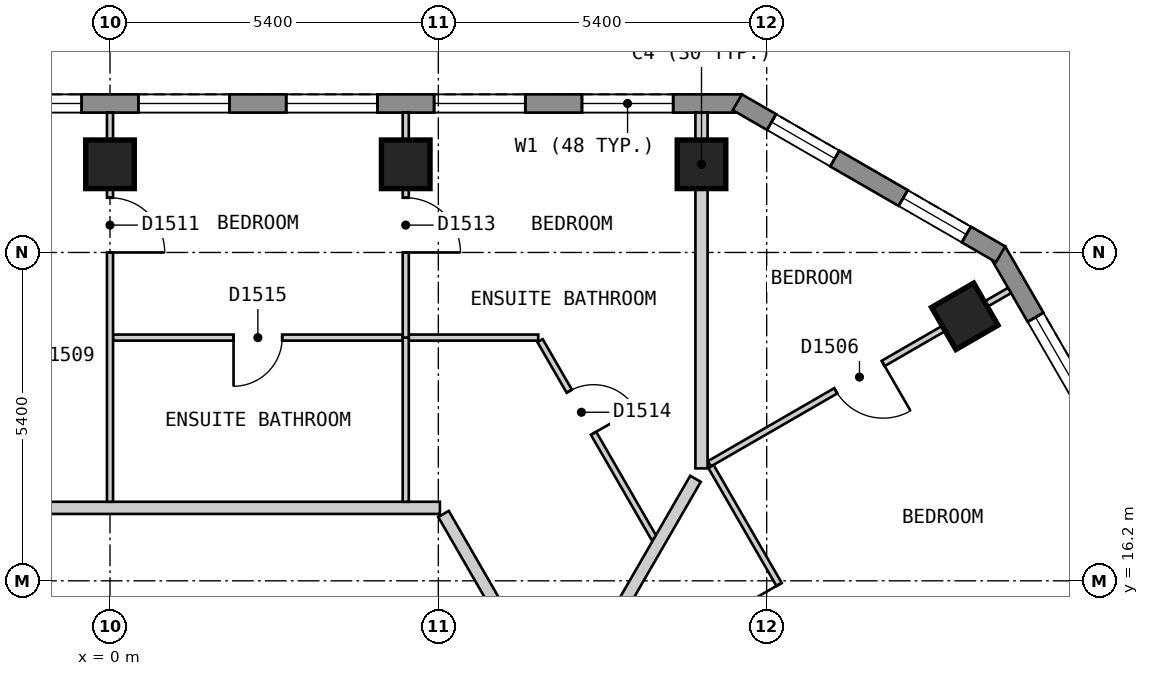
"""IFC4 building model, lengths in metres.
Left out: names, types, materials, properties, quantities, classifications, styles, units other than length and angle.
Written with IfcOpenShell. Run it as: python <this file> out.ifc"""

import sys

from ifc_helpers import new_model, si_unit, direction, frame, frame_2d, origin, origin_2d, place, context, subcontext, project, spatial, polyline, rectangle, outline, extrude, element, fill, save


model = new_model("IFC4")
c1 = context("Model", 3, precision=1e-05, world=origin(), true_north=direction((0.0, 1.0)))
c2 = subcontext(c1, "Body", "Model", "MODEL_VIEW")
j1 = project(units=[si_unit("LENGTHUNIT", "METRE"), si_unit("PLANEANGLEUNIT", "RADIAN")], contexts=[c1])
p1 = place(None, origin())
s1 = spatial("IfcSite", under=j1, at=p1, CompositionType="ELEMENT")
p2 = place(p1, origin())
s2 = spatial("IfcBuilding", under=s1, at=p2, CompositionType="ELEMENT")
p3 = place(p2, frame((0.0, 0.0, 184.2)))
s3 = spatial("IfcBuildingStorey", under=s2, at=p3, CompositionType="ELEMENT", Elevation=184.2)
for number, where, z_axis, x_axis in (
    (1, (9.728, 23.05, 0.0), (0.0, 0.0, 1.0), (-1.0, 0.0, 0.0)),
    (2, (4.864, 23.05, 0.0), (0.0, 0.0, 1.0), (-1.0, 0.0, 0.0)),
    (3, (0.0, 23.05, 0.0), (0.0, 0.0, 1.0), (-1.0, 0.0, 0.0)),
    (4, (14.058, 20.55, 0.0), (0.0, 0.0, 1.0), (-0.5, 0.866, 0.0)),
):
    element("IfcColumn", number, at=place(p3, frame(where, z_axis=z_axis, x_axis=x_axis)), inside=s3, PredefinedType="COLUMN", context=c2, shape_type="SweptSolid", body=[
        extrude(rectangle(XDim=0.8, YDim=0.8, at=origin_2d()), origin(), (0.0, 0.0, 1.0), 3.0),
    ])
p4 = place(p3, frame((10.392, 24.05, 0.0), z_axis=(0.0, 0.0, 1.0), x_axis=(-1.0, 0.0, 0.0)))
e5 = element("IfcWall", 5, at=p4, inside=s3, PredefinedType="SOLIDWALL", context=c2, shape_type="SweptSolid", body=[
    extrude(outline(polyline([(0.0, -0.15), (20.784, -0.15), (20.704, 0.15), (0.08, 0.15), (0.0, -0.15)])), origin(), (0.0, 0.0, 1.0), 2.7),
])
p5 = place(p4, frame((1.13, 0.0, 0.15)))
e6 = element("IfcOpeningElement", 6, at=p5, cuts=e5, PredefinedType="OPENING", context=c2, shape_type="SweptSolid", body=[
    extrude(rectangle(XDim=1.5, YDim=2.1, at=frame_2d((0.75, 1.05))), frame((0.0, 0.16, 0.0), z_axis=(0.0, -1.0, 0.0), x_axis=(1.0, 0.0, 0.0)), (0.0, 0.0, 1.0), 0.32),
])
p6 = place(p4, frame((3.562, 0.0, 0.15)))
e7 = element("IfcOpeningElement", 7, at=p6, cuts=e5, PredefinedType="OPENING", context=c2, shape_type="SweptSolid", body=[
    extrude(rectangle(XDim=1.5, YDim=2.1, at=frame_2d((0.75, 1.05))), frame((0.0, 0.16, 0.0), z_axis=(0.0, -1.0, 0.0), x_axis=(1.0, 0.0, 0.0)), (0.0, 0.0, 1.0), 0.32),
])
p7 = place(p4, frame((5.994, 0.0, 0.15)))
e8 = element("IfcOpeningElement", 8, at=p7, cuts=e5, PredefinedType="OPENING", context=c2, shape_type="SweptSolid", body=[
    extrude(rectangle(XDim=1.5, YDim=2.1, at=frame_2d((0.75, 1.05))), frame((0.0, 0.16, 0.0), z_axis=(0.0, -1.0, 0.0), x_axis=(1.0, 0.0, 0.0)), (0.0, 0.0, 1.0), 0.32),
])
p8 = place(p4, frame((8.426, 0.0, 0.15)))
e9 = element("IfcOpeningElement", 9, at=p8, cuts=e5, PredefinedType="OPENING", context=c2, shape_type="SweptSolid", body=[
    extrude(rectangle(XDim=1.5, YDim=2.1, at=frame_2d((0.75, 1.05))), frame((0.0, 0.16, 0.0), z_axis=(0.0, -1.0, 0.0), x_axis=(1.0, 0.0, 0.0)), (0.0, 0.0, 1.0), 0.32),
])
p9 = place(p4, frame((10.858, 0.0, 0.15)))
e10 = element("IfcOpeningElement", 10, at=p9, cuts=e5, PredefinedType="OPENING", context=c2, shape_type="SweptSolid", body=[
    extrude(rectangle(XDim=1.5, YDim=2.1, at=frame_2d((0.75, 1.05))), frame((0.0, 0.16, 0.0), z_axis=(0.0, -1.0, 0.0), x_axis=(1.0, 0.0, 0.0)), (0.0, 0.0, 1.0), 0.32),
])
p10 = place(p4, frame((13.29, 0.0, 0.15)))
e11 = element("IfcOpeningElement", 11, at=p10, cuts=e5, PredefinedType="OPENING", context=c2, shape_type="SweptSolid", body=[
    extrude(rectangle(XDim=1.5, YDim=2.1, at=frame_2d((0.75, 1.05))), frame((0.0, 0.16, 0.0), z_axis=(0.0, -1.0, 0.0), x_axis=(1.0, 0.0, 0.0)), (0.0, 0.0, 1.0), 0.32),
])
p11 = place(p4, frame((15.722, 0.0, 0.15)))
e12 = element("IfcOpeningElement", 12, at=p11, cuts=e5, PredefinedType="OPENING", context=c2, shape_type="SweptSolid", body=[
    extrude(rectangle(XDim=1.5, YDim=2.1, at=frame_2d((0.75, 1.05))), frame((0.0, 0.16, 0.0), z_axis=(0.0, -1.0, 0.0), x_axis=(1.0, 0.0, 0.0)), (0.0, 0.0, 1.0), 0.32),
])
p12 = place(p4, frame((18.154, 0.0, 0.15)))
e13 = element("IfcOpeningElement", 13, at=p12, cuts=e5, PredefinedType="OPENING", context=c2, shape_type="SweptSolid", body=[
    extrude(rectangle(XDim=1.5, YDim=2.1, at=frame_2d((0.75, 1.05))), frame((0.0, 0.16, 0.0), z_axis=(0.0, -1.0, 0.0), x_axis=(1.0, 0.0, 0.0)), (0.0, 0.0, 1.0), 0.32),
])
p13 = place(p3, frame((26.024, 1.825, 0.0), z_axis=(0.0, 0.0, 1.0), x_axis=(-0.500010537973, 0.866019319597, 0.0)))
e14 = element("IfcWall", 14, at=p13, inside=s3, PredefinedType="SOLIDWALL", context=c2, shape_type="SweptSolid", body=[
    extrude(outline(polyline([(0.0, -0.15), (22.863, -0.15), (22.783, 0.15), (0.08, 0.15), (0.0, -0.15)])), origin(), (0.0, 0.0, 1.0), 2.7),
])
p14 = place(p13, frame((1.259, 0.0, 0.15)))
e15 = element("IfcOpeningElement", 15, at=p14, cuts=e14, PredefinedType="OPENING", context=c2, shape_type="SweptSolid", body=[
    extrude(rectangle(XDim=1.5, YDim=2.1, at=frame_2d((0.75, 1.05))), frame((0.0, 0.16, 0.0), z_axis=(0.0, -1.0, 0.0), x_axis=(1.0, 0.0, 0.0)), (0.0, 0.0, 1.0), 0.32),
])
p15 = place(p13, frame((3.952, 0.0, 0.15)))
e16 = element("IfcOpeningElement", 16, at=p15, cuts=e14, PredefinedType="OPENING", context=c2, shape_type="SweptSolid", body=[
    extrude(rectangle(XDim=1.5, YDim=2.1, at=frame_2d((0.75, 1.05))), frame((0.0, 0.16, 0.0), z_axis=(0.0, -1.0, 0.0), x_axis=(1.0, 0.0, 0.0)), (0.0, 0.0, 1.0), 0.32),
])
p16 = place(p13, frame((6.644, 0.0, 0.15)))
e17 = element("IfcOpeningElement", 17, at=p16, cuts=e14, PredefinedType="OPENING", context=c2, shape_type="SweptSolid", body=[
    extrude(rectangle(XDim=1.5, YDim=2.1, at=frame_2d((0.75, 1.05))), frame((0.0, 0.16, 0.0), z_axis=(0.0, -1.0, 0.0), x_axis=(1.0, 0.0, 0.0)), (0.0, 0.0, 1.0), 0.32),
])
p17 = place(p13, frame((9.335, 0.0, 0.15)))
e18 = element("IfcOpeningElement", 18, at=p17, cuts=e14, PredefinedType="OPENING", context=c2, shape_type="SweptSolid", body=[
    extrude(rectangle(XDim=1.5, YDim=2.1, at=frame_2d((0.75, 1.05))), frame((0.0, 0.16, 0.0), z_axis=(0.0, -1.0, 0.0), x_axis=(1.0, 0.0, 0.0)), (0.0, 0.0, 1.0), 0.32),
])
p18 = place(p13, frame((12.028, 0.0, 0.15)))
e19 = element("IfcOpeningElement", 19, at=p18, cuts=e14, PredefinedType="OPENING", context=c2, shape_type="SweptSolid", body=[
    extrude(rectangle(XDim=1.5, YDim=2.1, at=frame_2d((0.75, 1.05))), frame((0.0, 0.16, 0.0), z_axis=(0.0, -1.0, 0.0), x_axis=(1.0, 0.0, 0.0)), (0.0, 0.0, 1.0), 0.32),
])
p19 = place(p13, frame((14.72, 0.0, 0.15)))
e20 = element("IfcOpeningElement", 20, at=p19, cuts=e14, PredefinedType="OPENING", context=c2, shape_type="SweptSolid", body=[
    extrude(rectangle(XDim=1.5, YDim=2.1, at=frame_2d((0.75, 1.05))), frame((0.0, 0.16, 0.0), z_axis=(0.0, -1.0, 0.0), x_axis=(1.0, 0.0, 0.0)), (0.0, 0.0, 1.0), 0.32),
])
p20 = place(p13, frame((17.411, 0.0, 0.15)))
e21 = element("IfcOpeningElement", 21, at=p20, cuts=e14, PredefinedType="OPENING", context=c2, shape_type="SweptSolid", body=[
    extrude(rectangle(XDim=1.5, YDim=2.1, at=frame_2d((0.75, 1.05))), frame((0.0, 0.16, 0.0), z_axis=(0.0, -1.0, 0.0), x_axis=(1.0, 0.0, 0.0)), (0.0, 0.0, 1.0), 0.32),
])
p21 = place(p13, frame((20.104, 0.0, 0.15)))
e22 = element("IfcOpeningElement", 22, at=p21, cuts=e14, PredefinedType="OPENING", context=c2, shape_type="SweptSolid", body=[
    extrude(rectangle(XDim=1.5, YDim=2.1, at=frame_2d((0.75, 1.05))), frame((0.0, 0.16, 0.0), z_axis=(0.0, -1.0, 0.0), x_axis=(1.0, 0.0, 0.0)), (0.0, 0.0, 1.0), 0.32),
])
p22 = place(p3, frame((14.647, 21.57, 0.0), z_axis=(0.0, 0.0, 1.0), x_axis=(-0.866022959057, 0.500004234368, 0.0)))
e23 = element("IfcWall", 23, at=p22, inside=s3, PredefinedType="SOLIDWALL", context=c2, shape_type="SweptSolid", body=[
    extrude(outline(polyline([(0.0, -0.15), (5.0, -0.15), (4.92, 0.15), (0.08, 0.15), (0.0, -0.15)])), origin(), (0.0, 0.0, 1.0), 2.7),
])
p23 = place(p22, frame((0.65, 0.0, 0.15)))
e24 = element("IfcOpeningElement", 24, at=p23, cuts=e23, PredefinedType="OPENING", context=c2, shape_type="SweptSolid", body=[
    extrude(rectangle(XDim=1.2, YDim=2.1, at=frame_2d((0.6, 1.05))), frame((0.0, 0.16, 0.0), z_axis=(0.0, -1.0, 0.0), x_axis=(1.0, 0.0, 0.0)), (0.0, 0.0, 1.0), 0.32),
])
p24 = place(p22, frame((3.15, 0.0, 0.15)))
e25 = element("IfcOpeningElement", 25, at=p24, cuts=e23, PredefinedType="OPENING", context=c2, shape_type="SweptSolid", body=[
    extrude(rectangle(XDim=1.2, YDim=2.1, at=frame_2d((0.6, 1.05))), frame((0.0, 0.16, 0.0), z_axis=(0.0, -1.0, 0.0), x_axis=(1.0, 0.0, 0.0)), (0.0, 0.0, 1.0), 0.32),
])
p25 = place(p3, frame((5.485, 17.3, 0.0), z_axis=(0.0, 0.0, 1.0), x_axis=(0.499998905622, -0.866026035623, 0.0)))
e26 = element("IfcWall", 26, at=p25, inside=s3, PredefinedType="PARTITIONING", context=c2, shape_type="SweptSolid", body=[
    extrude(rectangle(XDim=10.524, YDim=0.2, at=frame_2d((5.262, 0.0))), origin(), (0.0, 0.0, 1.0), 2.7),
])
p26 = place(p25, frame((8.974, 0.0, 0.0)))
e27 = element("IfcOpeningElement", 27, at=p26, cuts=e26, PredefinedType="OPENING", context=c2, shape_type="SweptSolid", body=[
    extrude(rectangle(XDim=1.0, YDim=2.1, at=frame_2d((0.5, 1.05))), frame((0.0, 0.11, 0.0), z_axis=(0.0, -1.0, 0.0), x_axis=(1.0, 0.0, 0.0)), (0.0, 0.0, 1.0), 0.22),
])
p27 = place(p3, frame((-5.311, 17.4, 0.0), z_axis=(0.0, 0.0, 1.0), x_axis=(1.0, 0.0, 0.0)))
e28 = element("IfcWall", 28, at=p27, inside=s3, PredefinedType="PARTITIONING", context=c2, shape_type="SweptSolid", body=[
    extrude(rectangle(XDim=10.737, YDim=0.2, at=frame_2d((5.369, 0.0))), origin(), (0.0, 0.0, 1.0), 2.7),
])
p28 = place(p27, frame((2.429, 0.0, 0.0)))
e29 = element("IfcOpeningElement", 29, at=p28, cuts=e28, PredefinedType="OPENING", context=c2, shape_type="SweptSolid", body=[
    extrude(rectangle(XDim=0.9, YDim=2.1, at=frame_2d((0.45, 1.05))), frame((0.0, 0.11, 0.0), z_axis=(0.0, -1.0, 0.0), x_axis=(1.0, 0.0, 0.0)), (0.0, 0.0, 1.0), 0.22),
])
p29 = place(p3, frame((7.073, 20.15, 0.0), z_axis=(0.0, 0.0, 1.0), x_axis=(0.499917691695, -0.866072919292, 0.0)))
e30 = element("IfcWall", 30, at=p29, inside=s3, PredefinedType="PARTITIONING", context=c2, shape_type="SweptSolid", body=[
    extrude(rectangle(XDim=3.753, YDim=0.1, at=frame_2d((1.876, 0.0))), origin(), (0.0, 0.0, 1.0), 2.7),
])
p30 = place(p29, frame((0.96, 0.0, 0.0)))
e31 = element("IfcOpeningElement", 31, at=p30, cuts=e30, PredefinedType="OPENING", context=c2, shape_type="SweptSolid", body=[
    extrude(rectangle(XDim=0.8, YDim=2.1, at=frame_2d((0.4, 1.05))), frame((0.0, 0.06, 0.0), z_axis=(0.0, -1.0, 0.0), x_axis=(1.0, 0.0, 0.0)), (0.0, 0.0, 1.0), 0.12),
])
p31 = place(p3, frame((9.883, 18.082, 0.0), z_axis=(0.0, 0.0, 1.0), x_axis=(0.500004428835, -0.86602284678, 0.0)))
e32 = element("IfcWall", 32, at=p31, inside=s3, PredefinedType="PARTITIONING", context=c2, shape_type="SweptSolid", body=[
    extrude(rectangle(XDim=10.618, YDim=0.1, at=frame_2d((5.309, 0.0))), origin(), (0.0, 0.0, 1.0), 2.7),
])
p32 = place(p31, frame((7.657, 0.0, 0.0)))
e33 = element("IfcOpeningElement", 33, at=p32, cuts=e32, PredefinedType="OPENING", context=c2, shape_type="SweptSolid", body=[
    extrude(rectangle(XDim=0.9, YDim=2.1, at=frame_2d((0.45, 1.05))), frame((0.0, 0.06, 0.0), z_axis=(0.0, -1.0, 0.0), x_axis=(1.0, 0.0, 0.0)), (0.0, 0.0, 1.0), 0.12),
])
p33 = place(p31, frame((2.242, 0.0, 0.0)))
e34 = element("IfcOpeningElement", 34, at=p33, cuts=e32, PredefinedType="OPENING", context=c2, shape_type="SweptSolid", body=[
    extrude(rectangle(XDim=0.8, YDim=2.1, at=frame_2d((0.4, 1.05))), frame((0.0, 0.06, 0.0), z_axis=(0.0, -1.0, 0.0), x_axis=(1.0, 0.0, 0.0)), (0.0, 0.0, 1.0), 0.12),
])
p34 = place(p3, frame((0.05, 20.2, 0.0), z_axis=(0.0, 0.0, 1.0), x_axis=(1.0, 0.0, 0.0)))
e35 = element("IfcWall", 35, at=p34, inside=s3, PredefinedType="PARTITIONING", context=c2, shape_type="SweptSolid", body=[
    extrude(rectangle(XDim=6.993, YDim=0.1, at=frame_2d((3.497, 0.0))), origin(), (0.0, 0.0, 1.0), 2.7),
])
p35 = place(p34, frame((1.982, 0.0, 0.0)))
e36 = element("IfcOpeningElement", 36, at=p35, cuts=e35, PredefinedType="OPENING", context=c2, shape_type="SweptSolid", body=[
    extrude(rectangle(XDim=0.8, YDim=2.1, at=frame_2d((0.4, 1.05))), frame((0.0, 0.06, 0.0), z_axis=(0.0, -1.0, 0.0), x_axis=(1.0, 0.0, 0.0)), (0.0, 0.0, 1.0), 0.12),
])
p36 = place(p3, frame((4.864, 17.5, 0.0), z_axis=(0.0, 0.0, 1.0), x_axis=(0.0, 1.0, 0.0)))
e37 = element("IfcWall", 37, at=p36, inside=s3, PredefinedType="PARTITIONING", context=c2, shape_type="SweptSolid", body=[
    extrude(rectangle(XDim=2.7, YDim=0.1, at=frame_2d((1.35, 0.0))), origin(), (0.0, 0.0, 1.0), 2.7),
])
p37 = place(p3, frame((0.0, 17.5, 0.0), z_axis=(0.0, 0.0, 1.0), x_axis=(0.0, 1.0, 0.0)))
e38 = element("IfcWall", 38, at=p37, inside=s3, PredefinedType="PARTITIONING", context=c2, shape_type="SweptSolid", body=[
    extrude(rectangle(XDim=6.4, YDim=0.1, at=frame_2d((3.2, 0.0))), origin(), (0.0, 0.0, 1.0), 2.7),
])
p38 = place(p37, frame((4.1, 0.0, 0.0)))
e39 = element("IfcOpeningElement", 39, at=p38, cuts=e38, PredefinedType="OPENING", context=c2, shape_type="SweptSolid", body=[
    extrude(rectangle(XDim=0.9, YDim=2.1, at=frame_2d((0.45, 1.05))), frame((0.0, 0.06, 0.0), z_axis=(0.0, -1.0, 0.0), x_axis=(1.0, 0.0, 0.0)), (0.0, 0.0, 1.0), 0.12),
])
p39 = place(p3, frame((9.858, 18.125, 0.0), z_axis=(0.0, 0.0, 1.0), x_axis=(0.866004402611, 0.500036373335, 0.0)))
e40 = element("IfcWall", 40, at=p39, inside=s3, PredefinedType="PARTITIONING", context=c2, shape_type="SweptSolid", body=[
    extrude(rectangle(XDim=5.7, YDim=0.1, at=frame_2d((2.85, 0.0))), origin(), (0.0, 0.0, 1.0), 2.7),
])
p40 = place(p39, frame((2.4, 0.0, 0.0)))
e41 = element("IfcOpeningElement", 41, at=p40, cuts=e40, PredefinedType="OPENING", context=c2, shape_type="SweptSolid", body=[
    extrude(rectangle(XDim=0.9, YDim=2.1, at=frame_2d((0.45, 1.05))), frame((0.0, 0.06, 0.0), z_axis=(0.0, -1.0, 0.0), x_axis=(1.0, 0.0, 0.0)), (0.0, 0.0, 1.0), 0.12),
])
p41 = place(p3, frame((7.448, 14.1, 0.0), z_axis=(0.0, 0.0, 1.0), x_axis=(0.499961462843, 0.866047652079, 0.0)))
e42 = element("IfcWall", 42, at=p41, inside=s3, PredefinedType="PARTITIONING", context=c2, shape_type="SweptSolid", body=[
    extrude(rectangle(XDim=4.362, YDim=0.2, at=frame_2d((2.181, 0.0))), origin(), (0.0, 0.0, 1.0), 2.7),
])
p42 = place(p3, frame((9.728, 18.049, 0.0), z_axis=(0.0, 0.0, 1.0), x_axis=(0.0, 1.0, 0.0)))
e43 = element("IfcWall", 43, at=p42, inside=s3, PredefinedType="PARTITIONING", context=c2, shape_type="SweptSolid", body=[
    extrude(rectangle(XDim=5.851, YDim=0.2, at=frame_2d((2.925, 0.0))), origin(), (0.0, 0.0, 1.0), 2.7),
])
p43 = place(p3, frame((12.55, 13.463, 0.0), z_axis=(0.0, 0.0, 1.0), x_axis=(0.866004402611, 0.500036373335, 0.0)))
e44 = element("IfcWall", 44, at=p43, inside=s3, PredefinedType="PARTITIONING", context=c2, shape_type="SweptSolid", body=[
    extrude(rectangle(XDim=5.7, YDim=0.1, at=frame_2d((2.85, 0.0))), origin(), (0.0, 0.0, 1.0), 2.7),
])
p44 = place(p43, frame((2.4, 0.0, 0.0)))
e45 = element("IfcOpeningElement", 45, at=p44, cuts=e44, PredefinedType="OPENING", context=c2, shape_type="SweptSolid", body=[
    extrude(rectangle(XDim=0.9, YDim=2.1, at=frame_2d((0.45, 1.05))), frame((0.0, 0.06, 0.0), z_axis=(0.0, -1.0, 0.0), x_axis=(1.0, 0.0, 0.0)), (0.0, 0.0, 1.0), 0.12),
])
p45 = place(p3, frame((4.864, 20.2, 0.0), z_axis=(0.0, 0.0, 1.0), x_axis=(0.0, 1.0, 0.0)))
e46 = element("IfcWall", 46, at=p45, inside=s3, PredefinedType="PARTITIONING", context=c2, shape_type="SweptSolid", body=[
    extrude(rectangle(XDim=3.7, YDim=0.1, at=frame_2d((1.85, 0.0))), origin(), (0.0, 0.0, 1.0), 2.7),
])
p46 = place(p45, frame((1.4, 0.0, 0.0)))
e47 = element("IfcOpeningElement", 47, at=p46, cuts=e46, PredefinedType="OPENING", context=c2, shape_type="SweptSolid", body=[
    extrude(rectangle(XDim=0.9, YDim=2.1, at=frame_2d((0.45, 1.05))), frame((0.0, 0.06, 0.0), z_axis=(0.0, -1.0, 0.0), x_axis=(1.0, 0.0, 0.0)), (0.0, 0.0, 1.0), 0.12),
])
p47 = place(p5, origin())
e48 = element("IfcWindow", 48, at=p47, inside=s3, PartitioningType="SINGLE_PANEL", PredefinedType="WINDOW", context=c2, shape_type="SweptSolid", body=[
    extrude(rectangle(XDim=1.5, YDim=2.1, at=frame_2d((0.75, 1.05))), frame((0.0, 0.03, 0.0), z_axis=(0.0, -1.0, 0.0), x_axis=(1.0, 0.0, 0.0)), (0.0, 0.0, 1.0), 0.06),
])
fill(e6, e48)
p48 = place(p6, origin())
e49 = element("IfcWindow", 49, at=p48, inside=s3, PartitioningType="SINGLE_PANEL", PredefinedType="WINDOW", context=c2, shape_type="SweptSolid", body=[
    extrude(rectangle(XDim=1.5, YDim=2.1, at=frame_2d((0.75, 1.05))), frame((0.0, 0.03, 0.0), z_axis=(0.0, -1.0, 0.0), x_axis=(1.0, 0.0, 0.0)), (0.0, 0.0, 1.0), 0.06),
])
fill(e7, e49)
p49 = place(p7, origin())
e50 = element("IfcWindow", 50, at=p49, inside=s3, PartitioningType="SINGLE_PANEL", PredefinedType="WINDOW", context=c2, shape_type="SweptSolid", body=[
    extrude(rectangle(XDim=1.5, YDim=2.1, at=frame_2d((0.75, 1.05))), frame((0.0, 0.03, 0.0), z_axis=(0.0, -1.0, 0.0), x_axis=(1.0, 0.0, 0.0)), (0.0, 0.0, 1.0), 0.06),
])
fill(e8, e50)
p50 = place(p8, origin())
e51 = element("IfcWindow", 51, at=p50, inside=s3, PartitioningType="SINGLE_PANEL", PredefinedType="WINDOW", context=c2, shape_type="SweptSolid", body=[
    extrude(rectangle(XDim=1.5, YDim=2.1, at=frame_2d((0.75, 1.05))), frame((0.0, 0.03, 0.0), z_axis=(0.0, -1.0, 0.0), x_axis=(1.0, 0.0, 0.0)), (0.0, 0.0, 1.0), 0.06),
])
fill(e9, e51)
p51 = place(p9, origin())
e52 = element("IfcWindow", 52, at=p51, inside=s3, PartitioningType="SINGLE_PANEL", PredefinedType="WINDOW", context=c2, shape_type="SweptSolid", body=[
    extrude(rectangle(XDim=1.5, YDim=2.1, at=frame_2d((0.75, 1.05))), frame((0.0, 0.03, 0.0), z_axis=(0.0, -1.0, 0.0), x_axis=(1.0, 0.0, 0.0)), (0.0, 0.0, 1.0), 0.06),
])
fill(e10, e52)
p52 = place(p21, origin())
e53 = element("IfcWindow", 53, at=p52, inside=s3, PartitioningType="SINGLE_PANEL", PredefinedType="WINDOW", context=c2, shape_type="SweptSolid", body=[
    extrude(rectangle(XDim=1.5, YDim=2.1, at=frame_2d((0.75, 1.05))), frame((0.0, 0.03, 0.0), z_axis=(0.0, -1.0, 0.0), x_axis=(1.0, 0.0, 0.0)), (0.0, 0.0, 1.0), 0.06),
])
fill(e22, e53)
p53 = place(p23, origin())
e54 = element("IfcWindow", 54, at=p53, inside=s3, PartitioningType="SINGLE_PANEL", PredefinedType="WINDOW", context=c2, shape_type="SweptSolid", body=[
    extrude(rectangle(XDim=1.2, YDim=2.1, at=frame_2d((0.6, 1.05))), frame((0.0, 0.03, 0.0), z_axis=(0.0, -1.0, 0.0), x_axis=(1.0, 0.0, 0.0)), (0.0, 0.0, 1.0), 0.06),
])
fill(e24, e54)
p54 = place(p24, origin())
e55 = element("IfcWindow", 55, at=p54, inside=s3, PartitioningType="SINGLE_PANEL", PredefinedType="WINDOW", context=c2, shape_type="SweptSolid", body=[
    extrude(rectangle(XDim=1.2, YDim=2.1, at=frame_2d((0.6, 1.05))), frame((0.0, 0.03, 0.0), z_axis=(0.0, -1.0, 0.0), x_axis=(1.0, 0.0, 0.0)), (0.0, 0.0, 1.0), 0.06),
])
fill(e25, e55)
p55 = place(p40, origin())
e56 = element("IfcDoor", 56, at=p55, inside=s3, OperationType="SINGLE_SWING_RIGHT", PredefinedType="DOOR", context=c2, shape_type="SweptSolid", body=[
    extrude(rectangle(XDim=0.9, YDim=2.1, at=frame_2d((0.45, 1.05))), frame((0.0, 0.025, 0.0), z_axis=(0.0, -1.0, 0.0), x_axis=(1.0, 0.0, 0.0)), (0.0, 0.0, 1.0), 0.05),
])
fill(e41, e56)
p56 = place(p33, origin())
e57 = element("IfcDoor", 57, at=p56, inside=s3, OperationType="SINGLE_SWING_LEFT", PredefinedType="DOOR", context=c2, shape_type="SweptSolid", body=[
    extrude(rectangle(XDim=0.8, YDim=2.1, at=frame_2d((0.4, 1.05))), frame((0.0, 0.025, 0.0), z_axis=(0.0, -1.0, 0.0), x_axis=(1.0, 0.0, 0.0)), (0.0, 0.0, 1.0), 0.05),
])
fill(e34, e57)
p57 = place(p38, origin())
e58 = element("IfcDoor", 58, at=p57, inside=s3, OperationType="SINGLE_SWING_LEFT", PredefinedType="DOOR", context=c2, shape_type="SweptSolid", body=[
    extrude(rectangle(XDim=0.9, YDim=2.1, at=frame_2d((0.45, 1.05))), frame((0.0, 0.025, 0.0), z_axis=(0.0, -1.0, 0.0), x_axis=(1.0, 0.0, 0.0)), (0.0, 0.0, 1.0), 0.05),
])
fill(e39, e58)
p58 = place(p46, origin())
e59 = element("IfcDoor", 59, at=p58, inside=s3, OperationType="SINGLE_SWING_LEFT", PredefinedType="DOOR", context=c2, shape_type="SweptSolid", body=[
    extrude(rectangle(XDim=0.9, YDim=2.1, at=frame_2d((0.45, 1.05))), frame((0.0, 0.025, 0.0), z_axis=(0.0, -1.0, 0.0), x_axis=(1.0, 0.0, 0.0)), (0.0, 0.0, 1.0), 0.05),
])
fill(e47, e59)
p59 = place(p30, origin())
e60 = element("IfcDoor", 60, at=p59, inside=s3, OperationType="SINGLE_SWING_RIGHT", PredefinedType="DOOR", context=c2, shape_type="SweptSolid", body=[
    extrude(rectangle(XDim=0.8, YDim=2.1, at=frame_2d((0.4, 1.05))), frame((0.0, 0.025, 0.0), z_axis=(0.0, -1.0, 0.0), x_axis=(1.0, 0.0, 0.0)), (0.0, 0.0, 1.0), 0.05),
])
fill(e31, e60)
p60 = place(p35, origin())
e61 = element("IfcDoor", 61, at=p60, inside=s3, OperationType="SINGLE_SWING_LEFT", PredefinedType="DOOR", context=c2, shape_type="SweptSolid", body=[
    extrude(rectangle(XDim=0.8, YDim=2.1, at=frame_2d((0.4, 1.05))), frame((0.0, 0.025, 0.0), z_axis=(0.0, -1.0, 0.0), x_axis=(1.0, 0.0, 0.0)), (0.0, 0.0, 1.0), 0.05),
])
fill(e36, e61)
save(model, sys.argv[1])
